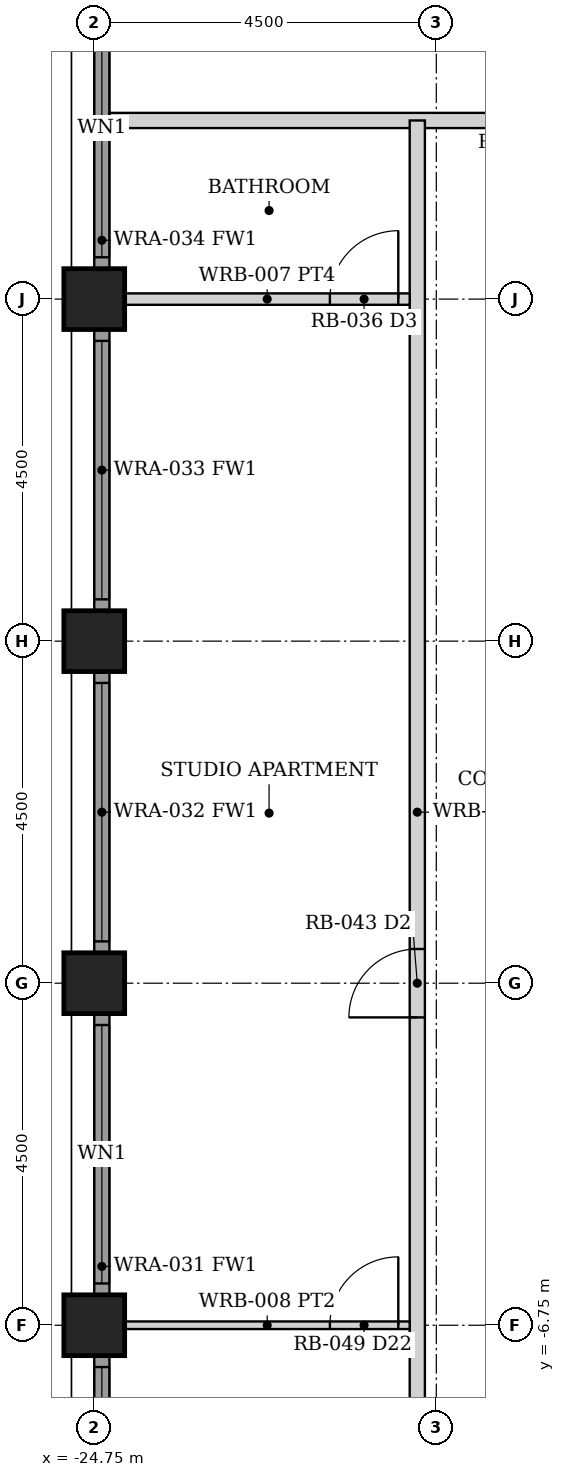
"""IFC4 building model, lengths in metres.
Left out: names, types, materials, properties, quantities, classifications, styles, units other than length and angle.
Written with IfcOpenShell. Run it as: python <this file> out.ifc"""

import sys

from ifc_helpers import new_model, si_unit, direction, frame, frame_2d, origin, origin_2d, place, context, subcontext, project, spatial, rectangle, hollow_rectangle, extrude, element, fill, save


model = new_model("IFC4")
c1 = context("Model", 3, precision=1e-05, world=origin(), true_north=direction((0.0, 1.0)))
c2 = subcontext(c1, "Body", "Model", "MODEL_VIEW")
j1 = project(units=[si_unit("LENGTHUNIT", "METRE"), si_unit("PLANEANGLEUNIT", "RADIAN")], contexts=[c1])
p1 = place(None, origin())
s1 = spatial("IfcSite", under=j1, at=p1, CompositionType="ELEMENT")
p2 = place(p1, origin())
s2 = spatial("IfcBuilding", under=s1, at=p2, CompositionType="ELEMENT")
p3 = place(p2, frame((0.0, 0.0, 37.0)))
s3 = spatial("IfcBuildingStorey", under=s2, at=p3, CompositionType="ELEMENT", Elevation=37.0)
for number, where, z_axis, x_axis in (
    (1, (-24.75, -6.75, 0.0), (0.0, 0.0, 1.0), (1.0, 0.0, 0.0)),
    (2, (-24.75, -2.25, 0.0), (0.0, 0.0, 1.0), (1.0, 0.0, 0.0)),
    (3, (-24.75, 2.25, 0.0), (0.0, 0.0, 1.0), (1.0, 0.0, 0.0)),
    (4, (-24.75, 6.75, 0.0), (0.0, 0.0, 1.0), (1.0, 0.0, 0.0)),
):
    element("IfcColumn", number, at=place(p3, frame(where, z_axis=z_axis, x_axis=x_axis)), inside=s3, PredefinedType="COLUMN", context=c2, shape_type="SweptSolid", body=[
        extrude(hollow_rectangle(XDim=0.8, YDim=0.8, WallThickness=0.07, at=origin_2d()), origin(), (0.0, 0.0, 1.0), 3.5),
    ])
p4 = place(p3, frame((-24.65, -10.845, 0.0), z_axis=(0.0, 0.0, 1.0), x_axis=(0.0, 1.0, 0.0)))
e5 = element("IfcWall", 5, at=p4, inside=s3, PredefinedType="SOLIDWALL", context=c2, shape_type="SweptSolid", body=[
    extrude(rectangle(XDim=3.69, YDim=0.2, at=frame_2d((1.845, 0.0))), origin(), (0.0, 0.0, 1.0), 2.379),
])
p5 = place(p4, frame((0.145, 0.0, 0.3)))
e6 = element("IfcOpeningElement", 6, at=p5, cuts=e5, PredefinedType="OPENING", context=c2, shape_type="SweptSolid", body=[
    extrude(rectangle(XDim=3.4, YDim=1.929, at=frame_2d((1.7, 0.964))), frame((0.0, 0.11, 0.0), z_axis=(0.0, -1.0, 0.0), x_axis=(1.0, 0.0, 0.0)), (0.0, 0.0, 1.0), 0.22),
])
p6 = place(p3, frame((-24.65, -6.345, 0.0), z_axis=(0.0, 0.0, 1.0), x_axis=(0.0, 1.0, 0.0)))
e7 = element("IfcWall", 7, at=p6, inside=s3, PredefinedType="SOLIDWALL", context=c2, shape_type="SweptSolid", body=[
    extrude(rectangle(XDim=3.69, YDim=0.2, at=frame_2d((1.845, 0.0))), origin(), (0.0, 0.0, 1.0), 2.379),
])
p7 = place(p6, frame((0.145, 0.0, 0.3)))
e8 = element("IfcOpeningElement", 8, at=p7, cuts=e7, PredefinedType="OPENING", context=c2, shape_type="SweptSolid", body=[
    extrude(rectangle(XDim=3.4, YDim=1.929, at=frame_2d((1.7, 0.964))), frame((0.0, 0.11, 0.0), z_axis=(0.0, -1.0, 0.0), x_axis=(1.0, 0.0, 0.0)), (0.0, 0.0, 1.0), 0.22),
])
p8 = place(p3, frame((-24.65, -1.845, 0.0), z_axis=(0.0, 0.0, 1.0), x_axis=(0.0, 1.0, 0.0)))
e9 = element("IfcWall", 9, at=p8, inside=s3, PredefinedType="SOLIDWALL", context=c2, shape_type="SweptSolid", body=[
    extrude(rectangle(XDim=3.69, YDim=0.2, at=frame_2d((1.845, 0.0))), origin(), (0.0, 0.0, 1.0), 2.379),
])
p9 = place(p8, frame((0.145, 0.0, 0.3)))
e10 = element("IfcOpeningElement", 10, at=p9, cuts=e9, PredefinedType="OPENING", context=c2, shape_type="SweptSolid", body=[
    extrude(rectangle(XDim=3.4, YDim=1.929, at=frame_2d((1.7, 0.964))), frame((0.0, 0.11, 0.0), z_axis=(0.0, -1.0, 0.0), x_axis=(1.0, 0.0, 0.0)), (0.0, 0.0, 1.0), 0.22),
])
p10 = place(p3, frame((-24.65, 2.655, 0.0), z_axis=(0.0, 0.0, 1.0), x_axis=(0.0, 1.0, 0.0)))
e11 = element("IfcWall", 11, at=p10, inside=s3, PredefinedType="SOLIDWALL", context=c2, shape_type="SweptSolid", body=[
    extrude(rectangle(XDim=3.69, YDim=0.2, at=frame_2d((1.845, 0.0))), origin(), (0.0, 0.0, 1.0), 2.379),
])
p11 = place(p10, frame((0.145, 0.0, 0.3)))
e12 = element("IfcOpeningElement", 12, at=p11, cuts=e11, PredefinedType="OPENING", context=c2, shape_type="SweptSolid", body=[
    extrude(rectangle(XDim=3.4, YDim=1.929, at=frame_2d((1.7, 0.964))), frame((0.0, 0.11, 0.0), z_axis=(0.0, -1.0, 0.0), x_axis=(1.0, 0.0, 0.0)), (0.0, 0.0, 1.0), 0.22),
])
p12 = place(p3, frame((-24.65, 7.155, 0.0), z_axis=(0.0, 0.0, 1.0), x_axis=(0.0, 1.0, 0.0)))
e13 = element("IfcWall", 13, at=p12, inside=s3, PredefinedType="SOLIDWALL", context=c2, shape_type="SweptSolid", body=[
    extrude(rectangle(XDim=3.69, YDim=0.2, at=frame_2d((1.845, 0.0))), origin(), (0.0, 0.0, 1.0), 2.379),
])
p13 = place(p12, frame((0.145, 0.0, 0.3)))
e14 = element("IfcOpeningElement", 14, at=p13, cuts=e13, PredefinedType="OPENING", context=c2, shape_type="SweptSolid", body=[
    extrude(rectangle(XDim=3.4, YDim=1.929, at=frame_2d((1.7, 0.964))), frame((0.0, 0.11, 0.0), z_axis=(0.0, -1.0, 0.0), x_axis=(1.0, 0.0, 0.0)), (0.0, 0.0, 1.0), 0.22),
])
p14 = place(p3, frame((-24.55, 9.1, 0.0), z_axis=(0.0, 0.0, 1.0), x_axis=(1.0, 0.0, 0.0)))
e15 = element("IfcWall", 15, at=p14, inside=s3, PredefinedType="PARTITIONING", context=c2, shape_type="SweptSolid", body=[
    extrude(rectangle(XDim=49.1, YDim=0.2, at=frame_2d((24.55, 0.0))), origin(), (0.0, 0.0, 1.0), 2.373),
])
p15 = place(p14, frame((5.1, 0.0, 0.0)))
e16 = element("IfcOpeningElement", 16, at=p15, cuts=e15, PredefinedType="OPENING", context=c2, shape_type="SweptSolid", body=[
    extrude(rectangle(XDim=0.9, YDim=2.1, at=frame_2d((0.45, 1.05))), frame((0.0, 0.11, 0.0), z_axis=(0.0, -1.0, 0.0), x_axis=(1.0, 0.0, 0.0)), (0.0, 0.0, 1.0), 0.22),
])
p16 = place(p14, frame((13.6, 0.0, 0.0)))
e17 = element("IfcOpeningElement", 17, at=p16, cuts=e15, PredefinedType="OPENING", context=c2, shape_type="SweptSolid", body=[
    extrude(rectangle(XDim=0.9, YDim=2.1, at=frame_2d((0.45, 1.05))), frame((0.0, 0.11, 0.0), z_axis=(0.0, -1.0, 0.0), x_axis=(1.0, 0.0, 0.0)), (0.0, 0.0, 1.0), 0.22),
])
p17 = place(p14, frame((18.0, 0.0, 0.0)))
e18 = element("IfcOpeningElement", 18, at=p17, cuts=e15, PredefinedType="OPENING", context=c2, shape_type="SweptSolid", body=[
    extrude(rectangle(XDim=0.9, YDim=2.1, at=frame_2d((0.45, 1.05))), frame((0.0, 0.11, 0.0), z_axis=(0.0, -1.0, 0.0), x_axis=(1.0, 0.0, 0.0)), (0.0, 0.0, 1.0), 0.22),
])
p18 = place(p14, frame((22.5, 0.0, 0.0)))
e19 = element("IfcOpeningElement", 19, at=p18, cuts=e15, PredefinedType="OPENING", context=c2, shape_type="SweptSolid", body=[
    extrude(rectangle(XDim=0.9, YDim=2.1, at=frame_2d((0.45, 1.05))), frame((0.0, 0.11, 0.0), z_axis=(0.0, -1.0, 0.0), x_axis=(1.0, 0.0, 0.0)), (0.0, 0.0, 1.0), 0.22),
])
p19 = place(p14, frame((27.0, 0.0, 0.0)))
e20 = element("IfcOpeningElement", 20, at=p19, cuts=e15, PredefinedType="OPENING", context=c2, shape_type="SweptSolid", body=[
    extrude(rectangle(XDim=0.9, YDim=2.1, at=frame_2d((0.45, 1.05))), frame((0.0, 0.11, 0.0), z_axis=(0.0, -1.0, 0.0), x_axis=(1.0, 0.0, 0.0)), (0.0, 0.0, 1.0), 0.22),
])
p20 = place(p14, frame((31.6, 0.0, 0.0)))
e21 = element("IfcOpeningElement", 21, at=p20, cuts=e15, PredefinedType="OPENING", context=c2, shape_type="SweptSolid", body=[
    extrude(rectangle(XDim=0.9, YDim=2.1, at=frame_2d((0.45, 1.05))), frame((0.0, 0.11, 0.0), z_axis=(0.0, -1.0, 0.0), x_axis=(1.0, 0.0, 0.0)), (0.0, 0.0, 1.0), 0.22),
])
p21 = place(p14, frame((43.1, 0.0, 0.0)))
e22 = element("IfcOpeningElement", 22, at=p21, cuts=e15, PredefinedType="OPENING", context=c2, shape_type="SweptSolid", body=[
    extrude(rectangle(XDim=0.9, YDim=2.1, at=frame_2d((0.45, 1.05))), frame((0.0, 0.11, 0.0), z_axis=(0.0, -1.0, 0.0), x_axis=(1.0, 0.0, 0.0)), (0.0, 0.0, 1.0), 0.22),
])
p22 = place(p3, frame((-20.5, -9.1, 0.0), z_axis=(0.0, 0.0, 1.0), x_axis=(0.0, 1.0, 0.0)))
e23 = element("IfcWall", 23, at=p22, inside=s3, PredefinedType="PARTITIONING", context=c2, shape_type="SweptSolid", body=[
    extrude(rectangle(XDim=18.2, YDim=0.2, at=frame_2d((9.1, 0.0))), origin(), (0.0, 0.0, 1.0), 2.373),
])
p23 = place(p22, frame((6.4, 0.0, 0.0)))
e24 = element("IfcOpeningElement", 24, at=p23, cuts=e23, PredefinedType="OPENING", context=c2, shape_type="SweptSolid", body=[
    extrude(rectangle(XDim=0.9, YDim=2.1, at=frame_2d((0.45, 1.05))), frame((0.0, 0.11, 0.0), z_axis=(0.0, -1.0, 0.0), x_axis=(1.0, 0.0, 0.0)), (0.0, 0.0, 1.0), 0.22),
])
p24 = place(p3, frame((-24.35, -6.75, 0.0), z_axis=(0.0, 0.0, 1.0), x_axis=(1.0, 0.0, 0.0)))
e25 = element("IfcWall", 25, at=p24, inside=s3, PredefinedType="PARTITIONING", context=c2, shape_type="SweptSolid", body=[
    extrude(rectangle(XDim=3.75, YDim=0.1, at=frame_2d((1.875, 0.0))), origin(), (0.0, 0.0, 1.0), 2.373),
])
p25 = place(p24, frame((2.7, 0.0, 0.0)))
e26 = element("IfcOpeningElement", 26, at=p25, cuts=e25, PredefinedType="OPENING", context=c2, shape_type="SweptSolid", body=[
    extrude(rectangle(XDim=0.9, YDim=2.1, at=frame_2d((0.45, 1.05))), frame((0.0, 0.06, 0.0), z_axis=(0.0, -1.0, 0.0), x_axis=(1.0, 0.0, 0.0)), (0.0, 0.0, 1.0), 0.12),
])
p26 = place(p3, frame((-24.35, 6.75, 0.0), z_axis=(0.0, 0.0, 1.0), x_axis=(1.0, 0.0, 0.0)))
e27 = element("IfcWall", 27, at=p26, inside=s3, PredefinedType="PARTITIONING", context=c2, shape_type="SweptSolid", body=[
    extrude(rectangle(XDim=3.75, YDim=0.15, at=frame_2d((1.875, 0.0))), origin(), (0.0, 0.0, 1.0), 2.373),
])
p27 = place(p26, frame((2.7, 0.0, 0.0)))
e28 = element("IfcOpeningElement", 28, at=p27, cuts=e27, PredefinedType="OPENING", context=c2, shape_type="SweptSolid", body=[
    extrude(rectangle(XDim=0.9, YDim=2.1, at=frame_2d((0.45, 1.05))), frame((0.0, 0.085, 0.0), z_axis=(0.0, -1.0, 0.0), x_axis=(1.0, 0.0, 0.0)), (0.0, 0.0, 1.0), 0.17),
])
p28 = place(p5, origin())
e29 = element("IfcWindow", 29, at=p28, inside=s3, PartitioningType="SINGLE_PANEL", PredefinedType="WINDOW", context=c2, shape_type="SweptSolid", body=[
    extrude(rectangle(XDim=3.4, YDim=1.929, at=frame_2d((1.7, 0.964))), frame((0.0, 0.03, 0.0), z_axis=(0.0, -1.0, 0.0), x_axis=(1.0, 0.0, 0.0)), (0.0, 0.0, 1.0), 0.06),
])
fill(e6, e29)
p29 = place(p7, origin())
e30 = element("IfcWindow", 30, at=p29, inside=s3, PartitioningType="SINGLE_PANEL", PredefinedType="WINDOW", context=c2, shape_type="SweptSolid", body=[
    extrude(rectangle(XDim=3.4, YDim=1.929, at=frame_2d((1.7, 0.964))), frame((0.0, 0.03, 0.0), z_axis=(0.0, -1.0, 0.0), x_axis=(1.0, 0.0, 0.0)), (0.0, 0.0, 1.0), 0.06),
])
fill(e8, e30)
p30 = place(p9, origin())
e31 = element("IfcWindow", 31, at=p30, inside=s3, PartitioningType="SINGLE_PANEL", PredefinedType="WINDOW", context=c2, shape_type="SweptSolid", body=[
    extrude(rectangle(XDim=3.4, YDim=1.929, at=frame_2d((1.7, 0.964))), frame((0.0, 0.03, 0.0), z_axis=(0.0, -1.0, 0.0), x_axis=(1.0, 0.0, 0.0)), (0.0, 0.0, 1.0), 0.06),
])
fill(e10, e31)
p31 = place(p11, origin())
e32 = element("IfcWindow", 32, at=p31, inside=s3, PartitioningType="SINGLE_PANEL", PredefinedType="WINDOW", context=c2, shape_type="SweptSolid", body=[
    extrude(rectangle(XDim=3.4, YDim=1.929, at=frame_2d((1.7, 0.964))), frame((0.0, 0.03, 0.0), z_axis=(0.0, -1.0, 0.0), x_axis=(1.0, 0.0, 0.0)), (0.0, 0.0, 1.0), 0.06),
])
fill(e12, e32)
p32 = place(p13, origin())
e33 = element("IfcWindow", 33, at=p32, inside=s3, PartitioningType="SINGLE_PANEL", PredefinedType="WINDOW", context=c2, shape_type="SweptSolid", body=[
    extrude(rectangle(XDim=3.4, YDim=1.929, at=frame_2d((1.7, 0.964))), frame((0.0, 0.03, 0.0), z_axis=(0.0, -1.0, 0.0), x_axis=(1.0, 0.0, 0.0)), (0.0, 0.0, 1.0), 0.06),
])
fill(e14, e33)
p33 = place(p25, origin())
e34 = element("IfcDoor", 34, at=p33, inside=s3, OperationType="SINGLE_SWING_RIGHT", PredefinedType="DOOR", context=c2, shape_type="SweptSolid", body=[
    extrude(rectangle(XDim=0.9, YDim=2.1, at=frame_2d((0.45, 1.05))), frame((0.0, 0.025, 0.0), z_axis=(0.0, -1.0, 0.0), x_axis=(1.0, 0.0, 0.0)), (0.0, 0.0, 1.0), 0.05),
])
fill(e26, e34)
p34 = place(p27, origin())
e35 = element("IfcDoor", 35, at=p34, inside=s3, OperationType="SINGLE_SWING_RIGHT", PredefinedType="DOOR", context=c2, shape_type="SweptSolid", body=[
    extrude(rectangle(XDim=0.9, YDim=2.1, at=frame_2d((0.45, 1.05))), frame((0.0, 0.025, 0.0), z_axis=(0.0, -1.0, 0.0), x_axis=(1.0, 0.0, 0.0)), (0.0, 0.0, 1.0), 0.05),
])
fill(e28, e35)
p35 = place(p23, origin())
e36 = element("IfcDoor", 36, at=p35, inside=s3, OperationType="SINGLE_SWING_LEFT", PredefinedType="DOOR", context=c2, shape_type="SweptSolid", body=[
    extrude(rectangle(XDim=0.9, YDim=2.1, at=frame_2d((0.45, 1.05))), frame((0.0, 0.025, 0.0), z_axis=(0.0, -1.0, 0.0), x_axis=(1.0, 0.0, 0.0)), (0.0, 0.0, 1.0), 0.05),
])
fill(e24, e36)
save(model, sys.argv[1])
